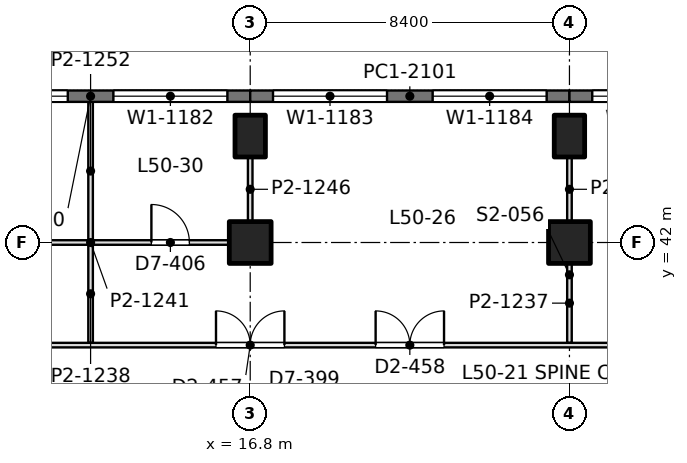
"""IFC4 building model, lengths in metres.
Left out: names, types, materials, properties, quantities, classifications, styles, units other than length and angle.
Written with IfcOpenShell. Run it as: python <this file> out.ifc"""

import sys

from ifc_helpers import new_model, si_unit, direction, frame, frame_2d, origin, origin_2d, place, context, subcontext, project, spatial, rectangle, extrude, element, fill, save


model = new_model("IFC4")
c1 = context("Model", 3, precision=1e-05, world=origin(), true_north=direction((0.0, 1.0)))
c2 = subcontext(c1, "Body", "Model", "MODEL_VIEW")
j1 = project(units=[si_unit("LENGTHUNIT", "METRE"), si_unit("PLANEANGLEUNIT", "RADIAN")], contexts=[c1])
p1 = place(None, origin())
s1 = spatial("IfcSite", under=j1, at=p1, CompositionType="ELEMENT")
p2 = place(p1, origin())
s2 = spatial("IfcBuilding", under=s1, at=p2, CompositionType="ELEMENT")
p3 = place(p2, frame((0.0, 0.0, 219.6)))
s3 = spatial("IfcBuildingStorey", under=s2, at=p3, CompositionType="ELEMENT", Elevation=219.6)
p4 = place(p3, frame((16.8, 42.0, 0.0), z_axis=(0.0, 0.0, 1.0), x_axis=(1.0, 0.0, 0.0)))
e1 = element("IfcColumn", 1, at=p4, inside=s3, PredefinedType="COLUMN", context=c2, shape_type="SweptSolid", body=[
    extrude(rectangle(XDim=1.1, YDim=1.1, at=origin_2d()), origin(), (0.0, 0.0, 1.0), 4.2),
])
p5 = place(p3, frame((16.8, 44.8, 0.0), z_axis=(0.0, 0.0, 1.0), x_axis=(1.0, 0.0, 0.0)))
e2 = element("IfcColumn", 2, at=p5, inside=s3, PredefinedType="COLUMN", context=c2, shape_type="SweptSolid", body=[
    extrude(rectangle(XDim=0.8, YDim=1.1, at=origin_2d()), origin(), (0.0, 0.0, 1.0), 4.2),
])
p6 = place(p3, frame((25.2, 42.0, 0.0), z_axis=(0.0, 0.0, 1.0), x_axis=(1.0, 0.0, 0.0)))
e3 = element("IfcColumn", 3, at=p6, inside=s3, PredefinedType="COLUMN", context=c2, shape_type="SweptSolid", body=[
    extrude(rectangle(XDim=1.1, YDim=1.1, at=origin_2d()), origin(), (0.0, 0.0, 1.0), 4.2),
])
p7 = place(p3, frame((25.2, 44.8, 0.0), z_axis=(0.0, 0.0, 1.0), x_axis=(1.0, 0.0, 0.0)))
e4 = element("IfcColumn", 4, at=p7, inside=s3, PredefinedType="COLUMN", context=c2, shape_type="SweptSolid", body=[
    extrude(rectangle(XDim=0.8, YDim=1.1, at=origin_2d()), origin(), (0.0, 0.0, 1.0), 4.2),
])
p8 = place(p3, frame((8.4, 45.85, 0.0), z_axis=(0.0, 0.0, 1.0), x_axis=(1.0, 0.0, 0.0)))
e5 = element("IfcWall", 5, at=p8, inside=s3, PredefinedType="SOLIDWALL", context=c2, shape_type="SweptSolid", body=[
    extrude(rectangle(XDim=8.4, YDim=0.3, at=frame_2d((4.2, 0.0))), origin(), (0.0, 0.0, 1.0), 4.05),
])
p9 = place(p8, frame((0.6, 0.0, 0.9)))
e6 = element("IfcOpeningElement", 6, at=p9, cuts=e5, PredefinedType="OPENING", context=c2, shape_type="SweptSolid", body=[
    extrude(rectangle(XDim=3.0, YDim=1.9, at=frame_2d((1.5, 0.95))), frame((0.0, 0.16, 0.0), z_axis=(0.0, -1.0, 0.0), x_axis=(1.0, 0.0, 0.0)), (0.0, 0.0, 1.0), 0.32),
])
p10 = place(p8, frame((4.8, 0.0, 0.9)))
e7 = element("IfcOpeningElement", 7, at=p10, cuts=e5, PredefinedType="OPENING", context=c2, shape_type="SweptSolid", body=[
    extrude(rectangle(XDim=3.0, YDim=1.9, at=frame_2d((1.5, 0.95))), frame((0.0, 0.16, 0.0), z_axis=(0.0, -1.0, 0.0), x_axis=(1.0, 0.0, 0.0)), (0.0, 0.0, 1.0), 0.32),
])
p11 = place(p3, frame((16.8, 45.85, 0.0), z_axis=(0.0, 0.0, 1.0), x_axis=(1.0, 0.0, 0.0)))
e8 = element("IfcWall", 8, at=p11, inside=s3, PredefinedType="SOLIDWALL", context=c2, shape_type="SweptSolid", body=[
    extrude(rectangle(XDim=8.4, YDim=0.3, at=frame_2d((4.2, 0.0))), origin(), (0.0, 0.0, 1.0), 4.05),
])
p12 = place(p11, frame((0.6, 0.0, 0.9)))
e9 = element("IfcOpeningElement", 9, at=p12, cuts=e8, PredefinedType="OPENING", context=c2, shape_type="SweptSolid", body=[
    extrude(rectangle(XDim=3.0, YDim=1.9, at=frame_2d((1.5, 0.95))), frame((0.0, 0.16, 0.0), z_axis=(0.0, -1.0, 0.0), x_axis=(1.0, 0.0, 0.0)), (0.0, 0.0, 1.0), 0.32),
])
p13 = place(p11, frame((4.8, 0.0, 0.9)))
e10 = element("IfcOpeningElement", 10, at=p13, cuts=e8, PredefinedType="OPENING", context=c2, shape_type="SweptSolid", body=[
    extrude(rectangle(XDim=3.0, YDim=1.9, at=frame_2d((1.5, 0.95))), frame((0.0, 0.16, 0.0), z_axis=(0.0, -1.0, 0.0), x_axis=(1.0, 0.0, 0.0)), (0.0, 0.0, 1.0), 0.32),
])
p14 = place(p3, frame((25.2, 45.85, 0.0), z_axis=(0.0, 0.0, 1.0), x_axis=(1.0, 0.0, 0.0)))
e11 = element("IfcWall", 11, at=p14, inside=s3, PredefinedType="SOLIDWALL", context=c2, shape_type="SweptSolid", body=[
    extrude(rectangle(XDim=8.4, YDim=0.3, at=frame_2d((4.2, 0.0))), origin(), (0.0, 0.0, 1.0), 4.05),
])
p15 = place(p14, frame((0.6, 0.0, 0.9)))
e12 = element("IfcOpeningElement", 12, at=p15, cuts=e11, PredefinedType="OPENING", context=c2, shape_type="SweptSolid", body=[
    extrude(rectangle(XDim=3.0, YDim=1.9, at=frame_2d((1.5, 0.95))), frame((0.0, 0.16, 0.0), z_axis=(0.0, -1.0, 0.0), x_axis=(1.0, 0.0, 0.0)), (0.0, 0.0, 1.0), 0.32),
])
p16 = place(p14, frame((4.8, 0.0, 0.9)))
e13 = element("IfcOpeningElement", 13, at=p16, cuts=e11, PredefinedType="OPENING", context=c2, shape_type="SweptSolid", body=[
    extrude(rectangle(XDim=3.0, YDim=1.9, at=frame_2d((1.5, 0.95))), frame((0.0, 0.16, 0.0), z_axis=(0.0, -1.0, 0.0), x_axis=(1.0, 0.0, 0.0)), (0.0, 0.0, 1.0), 0.32),
])
p17 = place(p3, frame((8.949, 42.0, 0.0), z_axis=(0.0, 0.0, 1.0), x_axis=(1.0, 0.0, 0.0)))
e14 = element("IfcWall", 14, at=p17, inside=s3, PredefinedType="PARTITIONING", context=c2, shape_type="SweptSolid", body=[
    extrude(rectangle(XDim=7.302, YDim=0.12, at=frame_2d((3.651, 0.0))), origin(), (0.0, 0.0, 1.0), 3.55),
])
p18 = place(p17, frame((1.051, 0.0, 0.0)))
e15 = element("IfcOpeningElement", 15, at=p18, cuts=e14, PredefinedType="OPENING", context=c2, shape_type="SweptSolid", body=[
    extrude(rectangle(XDim=1.0, YDim=2.4, at=frame_2d((0.5, 1.2))), frame((0.0, 0.07, 0.0), z_axis=(0.0, -1.0, 0.0), x_axis=(1.0, 0.0, 0.0)), (0.0, 0.0, 1.0), 0.14),
])
p19 = place(p17, frame((5.251, 0.0, 0.0)))
e16 = element("IfcOpeningElement", 16, at=p19, cuts=e14, PredefinedType="OPENING", context=c2, shape_type="SweptSolid", body=[
    extrude(rectangle(XDim=1.0, YDim=2.4, at=frame_2d((0.5, 1.2))), frame((0.0, 0.07, 0.0), z_axis=(0.0, -1.0, 0.0), x_axis=(1.0, 0.0, 0.0)), (0.0, 0.0, 1.0), 0.14),
])
p20 = place(p3, frame((12.6, 42.058, 0.0), z_axis=(0.0, 0.0, 1.0), x_axis=(0.0, 1.0, 0.0)))
e17 = element("IfcWall", 17, at=p20, inside=s3, PredefinedType="PARTITIONING", context=c2, shape_type="SweptSolid", body=[
    extrude(rectangle(XDim=3.644, YDim=0.12, at=frame_2d((1.822, 0.0))), origin(), (0.0, 0.0, 1.0), 3.55),
])
p21 = place(p3, frame((16.8, 42.549, 0.0), z_axis=(0.0, 0.0, 1.0), x_axis=(0.0, 1.0, 0.0)))
e18 = element("IfcWall", 18, at=p21, inside=s3, PredefinedType="PARTITIONING", context=c2, shape_type="SweptSolid", body=[
    extrude(rectangle(XDim=1.702, YDim=0.12, at=frame_2d((0.851, 0.0))), origin(), (0.0, 0.0, 1.0), 3.69),
])
p22 = place(p3, frame((12.6, 39.358, 0.0), z_axis=(0.0, 0.0, 1.0), x_axis=(0.0, 1.0, 0.0)))
e19 = element("IfcWall", 19, at=p22, inside=s3, PredefinedType="PARTITIONING", context=c2, shape_type="SweptSolid", body=[
    extrude(rectangle(XDim=2.584, YDim=0.12, at=frame_2d((1.292, 0.0))), origin(), (0.0, 0.0, 1.0), 3.55),
])
p23 = place(p3, frame((25.2, 39.358, 0.0), z_axis=(0.0, 0.0, 1.0), x_axis=(0.0, 1.0, 0.0)))
e20 = element("IfcWall", 20, at=p23, inside=s3, PredefinedType="PARTITIONING", context=c2, shape_type="SweptSolid", body=[
    extrude(rectangle(XDim=2.093, YDim=0.12, at=frame_2d((1.046, 0.0))), origin(), (0.0, 0.0, 1.0), 3.55),
])
p24 = place(p3, frame((25.2, 42.549, 0.0), z_axis=(0.0, 0.0, 1.0), x_axis=(0.0, 1.0, 0.0)))
e21 = element("IfcWall", 21, at=p24, inside=s3, PredefinedType="PARTITIONING", context=c2, shape_type="SweptSolid", body=[
    extrude(rectangle(XDim=1.702, YDim=0.12, at=frame_2d((0.851, 0.0))), origin(), (0.0, 0.0, 1.0), 3.69),
])
p25 = place(p3, frame((7.748, 39.3, 0.0), z_axis=(0.0, 0.0, 1.0), x_axis=(1.0, 0.0, 0.0)))
e22 = element("IfcWall", 22, at=p25, inside=s3, PredefinedType="PARTITIONING", context=c2, shape_type="SweptSolid", body=[
    extrude(rectangle(XDim=41.452, YDim=0.12, at=frame_2d((20.726, 0.0))), origin(), (0.0, 0.0, 1.0), 3.55),
])
p26 = place(p25, frame((1.527, 0.0, 0.0)))
e23 = element("IfcOpeningElement", 23, at=p26, cuts=e22, PredefinedType="OPENING", context=c2, shape_type="SweptSolid", body=[
    extrude(rectangle(XDim=1.8, YDim=2.2, at=frame_2d((0.9, 1.1))), frame((0.0, 0.07, 0.0), z_axis=(0.0, -1.0, 0.0), x_axis=(1.0, 0.0, 0.0)), (0.0, 0.0, 1.0), 0.14),
])
p27 = place(p25, frame((8.152, 0.0, 0.0)))
e24 = element("IfcOpeningElement", 24, at=p27, cuts=e22, PredefinedType="OPENING", context=c2, shape_type="SweptSolid", body=[
    extrude(rectangle(XDim=1.8, YDim=2.2, at=frame_2d((0.9, 1.1))), frame((0.0, 0.07, 0.0), z_axis=(0.0, -1.0, 0.0), x_axis=(1.0, 0.0, 0.0)), (0.0, 0.0, 1.0), 0.14),
])
p28 = place(p25, frame((12.352, 0.0, 0.0)))
e25 = element("IfcOpeningElement", 25, at=p28, cuts=e22, PredefinedType="OPENING", context=c2, shape_type="SweptSolid", body=[
    extrude(rectangle(XDim=1.8, YDim=2.2, at=frame_2d((0.9, 1.1))), frame((0.0, 0.07, 0.0), z_axis=(0.0, -1.0, 0.0), x_axis=(1.0, 0.0, 0.0)), (0.0, 0.0, 1.0), 0.14),
])
p29 = place(p25, frame((20.752, 0.0, 0.0)))
e26 = element("IfcOpeningElement", 26, at=p29, cuts=e22, PredefinedType="OPENING", context=c2, shape_type="SweptSolid", body=[
    extrude(rectangle(XDim=1.8, YDim=2.2, at=frame_2d((0.9, 1.1))), frame((0.0, 0.07, 0.0), z_axis=(0.0, -1.0, 0.0), x_axis=(1.0, 0.0, 0.0)), (0.0, 0.0, 1.0), 0.14),
])
p30 = place(p25, frame((24.952, 0.0, 0.0)))
e27 = element("IfcOpeningElement", 27, at=p30, cuts=e22, PredefinedType="OPENING", context=c2, shape_type="SweptSolid", body=[
    extrude(rectangle(XDim=1.8, YDim=2.2, at=frame_2d((0.9, 1.1))), frame((0.0, 0.07, 0.0), z_axis=(0.0, -1.0, 0.0), x_axis=(1.0, 0.0, 0.0)), (0.0, 0.0, 1.0), 0.14),
])
p31 = place(p25, frame((32.952, 0.0, 0.0)))
e28 = element("IfcOpeningElement", 28, at=p31, cuts=e22, PredefinedType="OPENING", context=c2, shape_type="SweptSolid", body=[
    extrude(rectangle(XDim=1.8, YDim=2.2, at=frame_2d((0.9, 1.1))), frame((0.0, 0.07, 0.0), z_axis=(0.0, -1.0, 0.0), x_axis=(1.0, 0.0, 0.0)), (0.0, 0.0, 1.0), 0.14),
])
p32 = place(p25, frame((36.752, 0.0, 0.0)))
e29 = element("IfcOpeningElement", 29, at=p32, cuts=e22, PredefinedType="OPENING", context=c2, shape_type="SweptSolid", body=[
    extrude(rectangle(XDim=1.8, YDim=2.2, at=frame_2d((0.9, 1.1))), frame((0.0, 0.07, 0.0), z_axis=(0.0, -1.0, 0.0), x_axis=(1.0, 0.0, 0.0)), (0.0, 0.0, 1.0), 0.14),
])
p33 = place(p9, origin())
e30 = element("IfcWindow", 30, at=p33, inside=s3, PartitioningType="SINGLE_PANEL", PredefinedType="WINDOW", context=c2, shape_type="SweptSolid", body=[
    extrude(rectangle(XDim=3.0, YDim=1.9, at=frame_2d((1.5, 0.95))), frame((0.0, 0.03, 0.0), z_axis=(0.0, -1.0, 0.0), x_axis=(1.0, 0.0, 0.0)), (0.0, 0.0, 1.0), 0.06),
])
fill(e6, e30)
p34 = place(p10, origin())
e31 = element("IfcWindow", 31, at=p34, inside=s3, PartitioningType="SINGLE_PANEL", PredefinedType="WINDOW", context=c2, shape_type="SweptSolid", body=[
    extrude(rectangle(XDim=3.0, YDim=1.9, at=frame_2d((1.5, 0.95))), frame((0.0, 0.03, 0.0), z_axis=(0.0, -1.0, 0.0), x_axis=(1.0, 0.0, 0.0)), (0.0, 0.0, 1.0), 0.06),
])
fill(e7, e31)
p35 = place(p12, origin())
e32 = element("IfcWindow", 32, at=p35, inside=s3, PartitioningType="SINGLE_PANEL", PredefinedType="WINDOW", context=c2, shape_type="SweptSolid", body=[
    extrude(rectangle(XDim=3.0, YDim=1.9, at=frame_2d((1.5, 0.95))), frame((0.0, 0.03, 0.0), z_axis=(0.0, -1.0, 0.0), x_axis=(1.0, 0.0, 0.0)), (0.0, 0.0, 1.0), 0.06),
])
fill(e9, e32)
p36 = place(p13, origin())
e33 = element("IfcWindow", 33, at=p36, inside=s3, PartitioningType="SINGLE_PANEL", PredefinedType="WINDOW", context=c2, shape_type="SweptSolid", body=[
    extrude(rectangle(XDim=3.0, YDim=1.9, at=frame_2d((1.5, 0.95))), frame((0.0, 0.03, 0.0), z_axis=(0.0, -1.0, 0.0), x_axis=(1.0, 0.0, 0.0)), (0.0, 0.0, 1.0), 0.06),
])
fill(e10, e33)
p37 = place(p15, origin())
e34 = element("IfcWindow", 34, at=p37, inside=s3, PartitioningType="SINGLE_PANEL", PredefinedType="WINDOW", context=c2, shape_type="SweptSolid", body=[
    extrude(rectangle(XDim=3.0, YDim=1.9, at=frame_2d((1.5, 0.95))), frame((0.0, 0.03, 0.0), z_axis=(0.0, -1.0, 0.0), x_axis=(1.0, 0.0, 0.0)), (0.0, 0.0, 1.0), 0.06),
])
fill(e12, e34)
p38 = place(p19, origin())
e35 = element("IfcDoor", 35, at=p38, inside=s3, OperationType="SINGLE_SWING_LEFT", PredefinedType="DOOR", context=c2, shape_type="SweptSolid", body=[
    extrude(rectangle(XDim=1.0, YDim=2.4, at=frame_2d((0.5, 1.2))), frame((0.0, 0.025, 0.0), z_axis=(0.0, -1.0, 0.0), x_axis=(1.0, 0.0, 0.0)), (0.0, 0.0, 1.0), 0.05),
])
fill(e16, e35)
p39 = place(p27, origin())
e36 = element("IfcDoor", 36, at=p39, inside=s3, OperationType="DOUBLE_DOOR_SINGLE_SWING", PredefinedType="DOOR", context=c2, shape_type="SweptSolid", body=[
    extrude(rectangle(XDim=1.8, YDim=2.2, at=frame_2d((0.9, 1.1))), frame((0.0, 0.025, 0.0), z_axis=(0.0, -1.0, 0.0), x_axis=(1.0, 0.0, 0.0)), (0.0, 0.0, 1.0), 0.05),
])
fill(e24, e36)
p40 = place(p28, origin())
e37 = element("IfcDoor", 37, at=p40, inside=s3, OperationType="DOUBLE_DOOR_SINGLE_SWING", PredefinedType="DOOR", context=c2, shape_type="SweptSolid", body=[
    extrude(rectangle(XDim=1.8, YDim=2.2, at=frame_2d((0.9, 1.1))), frame((0.0, 0.025, 0.0), z_axis=(0.0, -1.0, 0.0), x_axis=(1.0, 0.0, 0.0)), (0.0, 0.0, 1.0), 0.05),
])
fill(e25, e37)
save(model, sys.argv[1])
